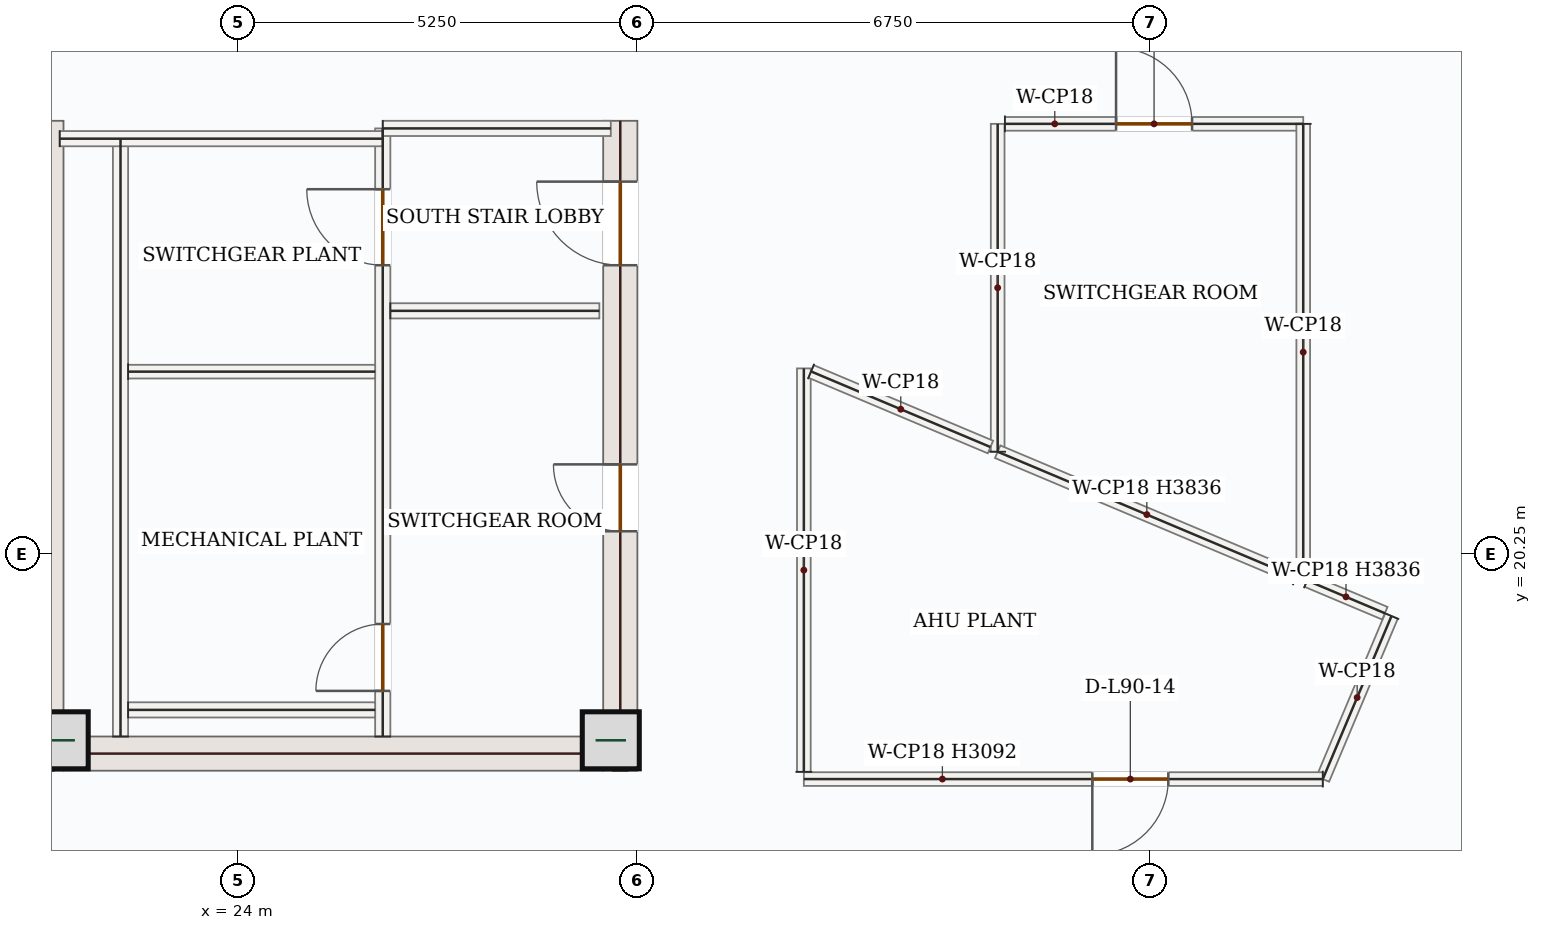
"""IFC4 building model, lengths in metres.
Left out: names, types, materials, properties, quantities, classifications, styles, units other than length and angle.
Written with IfcOpenShell. Run it as: python <this file> out.ifc"""

import sys

from ifc_helpers import new_model, si_unit, direction, frame, frame_2d, origin, origin_2d, place, context, subcontext, project, spatial, rectangle, extrude, source, transform, mapped, element, fill, save


model = new_model("IFC4")
c1 = context("Model", 3, precision=1e-05, world=origin(), true_north=direction((0.0, 1.0)))
c2 = subcontext(c1, "Body", "Model", "MODEL_VIEW")
j1 = project(units=[si_unit("LENGTHUNIT", "METRE"), si_unit("PLANEANGLEUNIT", "RADIAN")], contexts=[c1])
p1 = place(None, origin())
s1 = spatial("IfcSite", under=j1, at=p1, CompositionType="ELEMENT")
p2 = place(p1, origin())
s2 = spatial("IfcBuilding", under=s1, at=p2, CompositionType="ELEMENT")
p3 = place(p2, frame((0.0, 0.0, 370.65)))
s3 = spatial("IfcBuildingStorey", under=s2, at=p3, CompositionType="ELEMENT", Elevation=370.65)
m1 = source(origin(), c2, "Body", "SweptSolid", [
    extrude(rectangle(XDim=8.55, YDim=0.45, at=frame_2d((4.275, 0.0))), origin(), (0.0, 0.0, 1.0), 4.25),
])
p4 = place(p3, frame((21.475, 17.4, 0.0), z_axis=(0.0, 0.0, 1.0), x_axis=(0.0, 1.0, 0.0)))
e1 = element("IfcWall", 1, at=p4, inside=s3, PredefinedType="SHEAR", context=c2, shape_type="MappedRepresentation", body=[
    mapped(m1, transform((0.0, 0.0, 0.0), x_axis=(1.0, 0.0, 0.0), y_axis=(0.0, 1.0, 0.0), z_axis=(0.0, 0.0, 1.0), scale=1.0)),
])
p5 = place(p3, frame((29.025, 17.4, 0.0), z_axis=(0.0, 0.0, 1.0), x_axis=(0.0, 1.0, 0.0)))
e2 = element("IfcWall", 2, at=p5, inside=s3, PredefinedType="SHEAR", context=c2, shape_type="SweptSolid", body=[
    extrude(rectangle(XDim=8.55, YDim=0.45, at=frame_2d((4.275, 0.0))), origin(), (0.0, 0.0, 1.0), 4.25),
])
p6 = place(p5, frame((6.65, 0.0, 0.0)))
e3 = element("IfcOpeningElement", 3, at=p6, cuts=e2, PredefinedType="OPENING", context=c2, shape_type="SweptSolid", body=[
    extrude(rectangle(XDim=1.1, YDim=2.2, at=frame_2d((0.55, 1.1))), frame((0.0, 0.235, 0.0), z_axis=(0.0, -1.0, 0.0), x_axis=(1.0, 0.0, 0.0)), (0.0, 0.0, 1.0), 0.47),
])
p7 = place(p5, frame((3.15, 0.0, 0.0)))
e4 = element("IfcOpeningElement", 4, at=p7, cuts=e2, PredefinedType="OPENING", context=c2, shape_type="SweptSolid", body=[
    extrude(rectangle(XDim=0.88, YDim=2.1, at=frame_2d((0.44, 1.05))), frame((0.0, 0.235, 0.0), z_axis=(0.0, -1.0, 0.0), x_axis=(1.0, 0.0, 0.0)), (0.0, 0.0, 1.0), 0.47),
])
m2 = source(origin(), c2, "Body", "SweptSolid", [
    extrude(rectangle(XDim=7.1, YDim=0.45, at=frame_2d((3.55, 0.0))), origin(), (0.0, 0.0, 1.0), 4.25),
])
p8 = place(p3, frame((21.7, 17.625, 0.0), z_axis=(0.0, 0.0, 1.0), x_axis=(1.0, 0.0, 0.0)))
e5 = element("IfcWall", 5, at=p8, inside=s3, PredefinedType="SHEAR", context=c2, shape_type="MappedRepresentation", body=[
    mapped(m2, transform((0.0, 0.0, 0.0), x_axis=(1.0, 0.0, 0.0), y_axis=(0.0, 1.0, 0.0), z_axis=(0.0, 0.0, 1.0), scale=1.0)),
])
m3 = source(origin(), c2, "Body", "SweptSolid", [
    extrude(rectangle(XDim=0.75, YDim=0.75, at=origin_2d()), origin(), (0.0, 0.0, 1.0), 4.5),
])
for number, where, z_axis, x_axis in (
    (6, (21.65, 17.8, 0.0), (0.0, 0.0, 1.0), (1.0, 0.0, 0.0)),
    (7, (28.9, 17.8, 0.0), (0.0, 0.0, 1.0), (1.0, 0.0, 0.0)),
):
    element("IfcColumn", number, at=place(p3, frame(where, z_axis=z_axis, x_axis=x_axis)), inside=s3, PredefinedType="COLUMN", context=c2, shape_type="MappedRepresentation", body=[
        mapped(m3, transform((0.0, 0.0, 0.0), x_axis=(1.0, 0.0, 0.0), y_axis=(0.0, 1.0, 0.0), z_axis=(0.0, 0.0, 1.0), scale=1.0)),
    ])
m4 = source(origin(), c2, "Body", "SweptSolid", [
    extrude(rectangle(XDim=5.258, YDim=0.26, at=frame_2d((2.629, 0.0))), origin(), (0.0, 0.0, 1.0), 4.25),
])
p9 = place(p3, frame((22.658, 14.74, 0.0), z_axis=(0.0, 0.0, 1.0), x_axis=(-0.707106781187, 0.707106781187, 0.0)))
e8 = element("IfcWall", 8, at=p9, inside=s3, PredefinedType="SOLIDWALL", context=c2, shape_type="MappedRepresentation", body=[
    mapped(m4, transform((0.0, 0.0, 0.0), x_axis=(1.0, 0.0, 0.0), y_axis=(0.0, 1.0, 0.0), z_axis=(0.0, 0.0, 1.0), scale=1.0)),
])
m5 = source(origin(), c2, "Body", "SweptSolid", [
    extrude(rectangle(XDim=7.87, YDim=0.2, at=frame_2d((3.935, 0.0))), origin(), (0.0, 0.0, 1.0), 4.25),
])
p10 = place(p3, frame((22.45, 17.85, 0.0), z_axis=(0.0, 0.0, 1.0), x_axis=(0.0, 1.0, 0.0)))
e9 = element("IfcWall", 9, at=p10, inside=s3, PredefinedType="SOLIDWALL", context=c2, shape_type="MappedRepresentation", body=[
    mapped(m5, transform((0.0, 0.0, 0.0), x_axis=(1.0, 0.0, 0.0), y_axis=(0.0, 1.0, 0.0), z_axis=(0.0, 0.0, 1.0), scale=1.0)),
])
p11 = place(p3, frame((25.9, 17.85, 0.0), z_axis=(0.0, 0.0, 1.0), x_axis=(0.0, 1.0, 0.0)))
e10 = element("IfcWall", 10, at=p11, inside=s3, PredefinedType="SOLIDWALL", context=c2, shape_type="SweptSolid", body=[
    extrude(rectangle(XDim=8.0, YDim=0.2, at=frame_2d((4.0, 0.0))), origin(), (0.0, 0.0, 1.0), 4.25),
])
p12 = place(p11, frame((6.2, 0.0, 0.0)))
e11 = element("IfcOpeningElement", 11, at=p12, cuts=e10, PredefinedType="OPENING", context=c2, shape_type="SweptSolid", body=[
    extrude(rectangle(XDim=1.0, YDim=2.15, at=frame_2d((0.5, 1.075))), frame((0.0, 0.11, 0.0), z_axis=(0.0, -1.0, 0.0), x_axis=(1.0, 0.0, 0.0)), (0.0, 0.0, 1.0), 0.22),
])
p13 = place(p11, frame((0.6, 0.0, 0.0)))
e12 = element("IfcOpeningElement", 12, at=p13, cuts=e10, PredefinedType="OPENING", context=c2, shape_type="SweptSolid", body=[
    extrude(rectangle(XDim=0.88, YDim=2.1, at=frame_2d((0.44, 1.05))), frame((0.0, 0.11, 0.0), z_axis=(0.0, -1.0, 0.0), x_axis=(1.0, 0.0, 0.0)), (0.0, 0.0, 1.0), 0.22),
])
m6 = source(origin(), c2, "Body", "SweptSolid", [
    extrude(rectangle(XDim=4.25, YDim=0.2, at=frame_2d((2.125, 0.0))), origin(), (0.0, 0.0, 1.0), 4.25),
])
p14 = place(p3, frame((21.65, 25.715, 0.0), z_axis=(0.0, 0.0, 1.0), x_axis=(1.0, 0.0, 0.0)))
e13 = element("IfcWall", 13, at=p14, inside=s3, PredefinedType="SOLIDWALL", context=c2, shape_type="MappedRepresentation", body=[
    mapped(m6, transform((0.0, 0.0, 0.0), x_axis=(1.0, 0.0, 0.0), y_axis=(0.0, 1.0, 0.0), z_axis=(0.0, 0.0, 1.0), scale=1.0)),
])
m7 = source(origin(), c2, "Body", "SweptSolid", [
    extrude(rectangle(XDim=3.0, YDim=0.2, at=frame_2d((1.5, 0.0))), origin(), (0.0, 0.0, 1.0), 4.25),
])
p15 = place(p3, frame((25.9, 25.85, 0.0), z_axis=(0.0, 0.0, 1.0), x_axis=(1.0, 0.0, 0.0)))
e14 = element("IfcWall", 14, at=p15, inside=s3, PredefinedType="SOLIDWALL", context=c2, shape_type="MappedRepresentation", body=[
    mapped(m7, transform((0.0, 0.0, 0.0), x_axis=(1.0, 0.0, 0.0), y_axis=(0.0, 1.0, 0.0), z_axis=(0.0, 0.0, 1.0), scale=1.0)),
])
m8 = source(origin(), c2, "Body", "SweptSolid", [
    extrude(rectangle(XDim=3.25, YDim=0.2, at=frame_2d((1.625, 0.0))), origin(), (0.0, 0.0, 1.0), 4.25),
])
p16 = place(p3, frame((22.55, 18.2, 0.0), z_axis=(0.0, 0.0, 1.0), x_axis=(1.0, 0.0, 0.0)))
e15 = element("IfcWall", 15, at=p16, inside=s3, PredefinedType="SOLIDWALL", context=c2, shape_type="MappedRepresentation", body=[
    mapped(m8, transform((0.0, 0.0, 0.0), x_axis=(1.0, 0.0, 0.0), y_axis=(0.0, 1.0, 0.0), z_axis=(0.0, 0.0, 1.0), scale=1.0)),
])
m9 = source(origin(), c2, "Body", "SweptSolid", [
    extrude(rectangle(XDim=3.25, YDim=0.18, at=frame_2d((1.625, 0.0))), origin(), (0.0, 0.0, 1.0), 4.25),
])
p17 = place(p3, frame((22.55, 22.65, 0.0), z_axis=(0.0, 0.0, 1.0), x_axis=(1.0, 0.0, 0.0)))
e16 = element("IfcWall", 16, at=p17, inside=s3, PredefinedType="PARTITIONING", context=c2, shape_type="MappedRepresentation", body=[
    mapped(m9, transform((0.0, 0.0, 0.0), x_axis=(1.0, 0.0, 0.0), y_axis=(0.0, 1.0, 0.0), z_axis=(0.0, 0.0, 1.0), scale=1.0)),
])
m10 = source(origin(), c2, "Body", "SweptSolid", [
    extrude(rectangle(XDim=2.75, YDim=0.2, at=frame_2d((1.375, 0.0))), origin(), (0.0, 0.0, 1.0), 4.25),
])
p18 = place(p3, frame((26.0, 23.45, 0.0), z_axis=(0.0, 0.0, 1.0), x_axis=(1.0, 0.0, 0.0)))
e17 = element("IfcWall", 17, at=p18, inside=s3, PredefinedType="SOLIDWALL", context=c2, shape_type="MappedRepresentation", body=[
    mapped(m10, transform((0.0, 0.0, 0.0), x_axis=(1.0, 0.0, 0.0), y_axis=(0.0, 1.0, 0.0), z_axis=(0.0, 0.0, 1.0), scale=1.0)),
])
m11 = source(origin(), c2, "Body", "SweptSolid", [
    extrude(rectangle(XDim=4.313, YDim=0.18, at=frame_2d((2.157, 0.0))), origin(), (0.0, 0.0, 1.0), 4.25),
])
p19 = place(p3, frame((33.99, 21.596, 0.0), z_axis=(0.0, 0.0, 1.0), x_axis=(0.0, 1.0, 0.0)))
e18 = element("IfcWall", 18, at=p19, inside=s3, PredefinedType="PARTITIONING", context=c2, shape_type="MappedRepresentation", body=[
    mapped(m11, transform((0.0, 0.0, 0.0), x_axis=(1.0, 0.0, 0.0), y_axis=(0.0, 1.0, 0.0), z_axis=(0.0, 0.0, 1.0), scale=1.0)),
])
p20 = place(p3, frame((34.085, 25.91, 0.0), z_axis=(0.0, 0.0, 1.0), x_axis=(1.0, 0.0, 0.0)))
e19 = element("IfcWall", 19, at=p20, inside=s3, PredefinedType="PARTITIONING", context=c2, shape_type="SweptSolid", body=[
    extrude(rectangle(XDim=3.925, YDim=0.18, at=frame_2d((1.962, 0.0))), origin(), (0.0, 0.0, 1.0), 4.25),
])
p21 = place(p20, frame((1.462, 0.0, 0.0)))
e20 = element("IfcOpeningElement", 20, at=p21, cuts=e19, PredefinedType="OPENING", context=c2, shape_type="SweptSolid", body=[
    extrude(rectangle(XDim=1.0, YDim=2.15, at=frame_2d((0.5, 1.075))), frame((0.0, 0.1, 0.0), z_axis=(0.0, -1.0, 0.0), x_axis=(1.0, 0.0, 0.0)), (0.0, 0.0, 1.0), 0.2),
])
m12 = source(origin(), c2, "Body", "SweptSolid", [
    extrude(rectangle(XDim=6.007, YDim=0.18, at=frame_2d((3.004, 0.0))), origin(), (0.0, 0.0, 1.0), 4.25),
])
p22 = place(p3, frame((38.01, 25.91, 0.0), z_axis=(0.0, 0.0, 1.0), x_axis=(0.0, -1.0, 0.0)))
e21 = element("IfcWall", 21, at=p22, inside=s3, PredefinedType="PARTITIONING", context=c2, shape_type="MappedRepresentation", body=[
    mapped(m12, transform((0.0, 0.0, 0.0), x_axis=(1.0, 0.0, 0.0), y_axis=(0.0, 1.0, 0.0), z_axis=(0.0, 0.0, 1.0), scale=1.0)),
])
m13 = source(origin(), c2, "Body", "SweptSolid", [
    extrude(rectangle(XDim=4.259, YDim=0.18, at=frame_2d((2.13, 0.0))), origin(), (0.0, 0.0, 1.0), 3.836),
])
p23 = place(p3, frame((37.915, 19.942, 0.0), z_axis=(0.0, 0.0, 1.0), x_axis=(-0.921517727691, 0.388336294403, 0.0)))
e22 = element("IfcWall", 22, at=p23, inside=s3, PredefinedType="PARTITIONING", context=c2, shape_type="MappedRepresentation", body=[
    mapped(m13, transform((0.0, 0.0, 0.0), x_axis=(1.0, 0.0, 0.0), y_axis=(0.0, 1.0, 0.0), z_axis=(0.0, 0.0, 1.0), scale=1.0)),
])
m14 = source(origin(), c2, "Body", "SweptSolid", [
    extrude(rectangle(XDim=2.327, YDim=0.18, at=frame_2d((1.164, 0.0))), origin(), (0.0, 0.0, 1.0), 4.25),
])
p24 = place(p3, frame((39.171, 19.435, 0.0), z_axis=(0.0, 0.0, 1.0), x_axis=(-0.388328975107, -0.921520812078, 0.0)))
e23 = element("IfcWall", 23, at=p24, inside=s3, PredefinedType="PARTITIONING", context=c2, shape_type="MappedRepresentation", body=[
    mapped(m14, transform((0.0, 0.0, 0.0), x_axis=(1.0, 0.0, 0.0), y_axis=(0.0, 1.0, 0.0), z_axis=(0.0, 0.0, 1.0), scale=1.0)),
])
p25 = place(p3, frame((38.267, 17.29, 0.0), z_axis=(0.0, 0.0, 1.0), x_axis=(-1.0, 0.0, 0.0)))
e24 = element("IfcWall", 24, at=p25, inside=s3, PredefinedType="PARTITIONING", context=c2, shape_type="SweptSolid", body=[
    extrude(rectangle(XDim=6.827, YDim=0.18, at=frame_2d((3.414, 0.0))), origin(), (0.0, 0.0, 1.0), 3.092),
])
p26 = place(p25, frame((2.032, 0.0, 0.0)))
e25 = element("IfcOpeningElement", 25, at=p26, cuts=e24, PredefinedType="OPENING", context=c2, shape_type="SweptSolid", body=[
    extrude(rectangle(XDim=1.0, YDim=2.15, at=frame_2d((0.5, 1.075))), frame((0.0, 0.1, 0.0), z_axis=(0.0, -1.0, 0.0), x_axis=(1.0, 0.0, 0.0)), (0.0, 0.0, 1.0), 0.2),
])
m15 = source(origin(), c2, "Body", "SweptSolid", [
    extrude(rectangle(XDim=5.308, YDim=0.18, at=frame_2d((2.654, 0.0))), origin(), (0.0, 0.0, 1.0), 4.25),
])
p27 = place(p3, frame((31.44, 17.385, 0.0), z_axis=(0.0, 0.0, 1.0), x_axis=(0.0, 1.0, 0.0)))
e26 = element("IfcWall", 26, at=p27, inside=s3, PredefinedType="PARTITIONING", context=c2, shape_type="MappedRepresentation", body=[
    mapped(m15, transform((0.0, 0.0, 0.0), x_axis=(1.0, 0.0, 0.0), y_axis=(0.0, 1.0, 0.0), z_axis=(0.0, 0.0, 1.0), scale=1.0)),
])
m16 = source(origin(), c2, "Body", "SweptSolid", [
    extrude(rectangle(XDim=2.561, YDim=0.18, at=frame_2d((1.281, 0.0))), origin(), (0.0, 0.0, 1.0), 4.25),
])
p28 = place(p3, frame((31.535, 22.653, 0.0), z_axis=(0.0, 0.0, 1.0), x_axis=(0.921543833829, -0.388274339008, 0.0)))
e27 = element("IfcWall", 27, at=p28, inside=s3, PredefinedType="PARTITIONING", context=c2, shape_type="MappedRepresentation", body=[
    mapped(m16, transform((0.0, 0.0, 0.0), x_axis=(1.0, 0.0, 0.0), y_axis=(0.0, 1.0, 0.0), z_axis=(0.0, 0.0, 1.0), scale=1.0)),
])
m17 = source(origin(), c2, "Body", "SweptSolid", [
    extrude(rectangle(XDim=1.109, YDim=0.18, at=frame_2d((0.555, 0.0))), origin(), (0.0, 0.0, 1.0), 3.836),
])
p29 = place(p3, frame((38.062, 19.903, 0.0), z_axis=(0.0, 0.0, 1.0), x_axis=(0.921473730863, -0.388440681866, 0.0)))
e28 = element("IfcWall", 28, at=p29, inside=s3, PredefinedType="PARTITIONING", context=c2, shape_type="MappedRepresentation", body=[
    mapped(m17, transform((0.0, 0.0, 0.0), x_axis=(1.0, 0.0, 0.0), y_axis=(0.0, 1.0, 0.0), z_axis=(0.0, 0.0, 1.0), scale=1.0)),
])
m18 = source(origin(), c2, "Body", "SweptSolid", [
    extrude(rectangle(XDim=1.0, YDim=2.15, at=frame_2d((0.5, 1.075))), frame((0.0, 0.025, 0.0), z_axis=(0.0, -1.0, 0.0), x_axis=(1.0, 0.0, 0.0)), (0.0, 0.0, 1.0), 0.05),
])
p30 = place(p12, origin())
e29 = element("IfcDoor", 29, at=p30, inside=s3, OperationType="SINGLE_SWING_RIGHT", PredefinedType="DOOR", context=c2, shape_type="MappedRepresentation", body=[
    mapped(m18, transform((0.0, 0.0, 0.0), x_axis=(1.0, 0.0, 0.0), y_axis=(0.0, 1.0, 0.0), z_axis=(0.0, 0.0, 1.0), scale=1.0)),
])
fill(e11, e29)
m19 = source(origin(), c2, "Body", "SweptSolid", [
    extrude(rectangle(XDim=0.88, YDim=2.1, at=frame_2d((0.44, 1.05))), frame((0.0, 0.025, 0.0), z_axis=(0.0, -1.0, 0.0), x_axis=(1.0, 0.0, 0.0)), (0.0, 0.0, 1.0), 0.05),
])
p31 = place(p13, origin())
e30 = element("IfcDoor", 30, at=p31, inside=s3, OperationType="SINGLE_SWING_LEFT", PredefinedType="DOOR", context=c2, shape_type="MappedRepresentation", body=[
    mapped(m19, transform((0.0, 0.0, 0.0), x_axis=(1.0, 0.0, 0.0), y_axis=(0.0, 1.0, 0.0), z_axis=(0.0, 0.0, 1.0), scale=1.0)),
])
fill(e12, e30)
m20 = source(origin(), c2, "Body", "SweptSolid", [
    extrude(rectangle(XDim=1.1, YDim=2.2, at=frame_2d((0.55, 1.1))), frame((0.0, 0.025, 0.0), z_axis=(0.0, -1.0, 0.0), x_axis=(1.0, 0.0, 0.0)), (0.0, 0.0, 1.0), 0.05),
])
p32 = place(p6, origin())
e31 = element("IfcDoor", 31, at=p32, inside=s3, OperationType="SINGLE_SWING_RIGHT", PredefinedType="DOOR", context=c2, shape_type="MappedRepresentation", body=[
    mapped(m20, transform((0.0, 0.0, 0.0), x_axis=(1.0, 0.0, 0.0), y_axis=(0.0, 1.0, 0.0), z_axis=(0.0, 0.0, 1.0), scale=1.0)),
])
fill(e3, e31)
p33 = place(p7, origin())
e32 = element("IfcDoor", 32, at=p33, inside=s3, OperationType="SINGLE_SWING_RIGHT", PredefinedType="DOOR", context=c2, shape_type="MappedRepresentation", body=[
    mapped(m19, transform((0.0, 0.0, 0.0), x_axis=(1.0, 0.0, 0.0), y_axis=(0.0, 1.0, 0.0), z_axis=(0.0, 0.0, 1.0), scale=1.0)),
])
fill(e4, e32)
p34 = place(p26, origin())
e33 = element("IfcDoor", 33, at=p34, inside=s3, OperationType="SINGLE_SWING_RIGHT", PredefinedType="DOOR", context=c2, shape_type="MappedRepresentation", body=[
    mapped(m18, transform((0.0, 0.0, 0.0), x_axis=(1.0, 0.0, 0.0), y_axis=(0.0, 1.0, 0.0), z_axis=(0.0, 0.0, 1.0), scale=1.0)),
])
fill(e25, e33)
p35 = place(p21, origin())
e34 = element("IfcDoor", 34, at=p35, inside=s3, OperationType="SINGLE_SWING_LEFT", PredefinedType="DOOR", context=c2, shape_type="MappedRepresentation", body=[
    mapped(m18, transform((0.0, 0.0, 0.0), x_axis=(1.0, 0.0, 0.0), y_axis=(0.0, 1.0, 0.0), z_axis=(0.0, 0.0, 1.0), scale=1.0)),
])
fill(e20, e34)
save(model, sys.argv[1])
